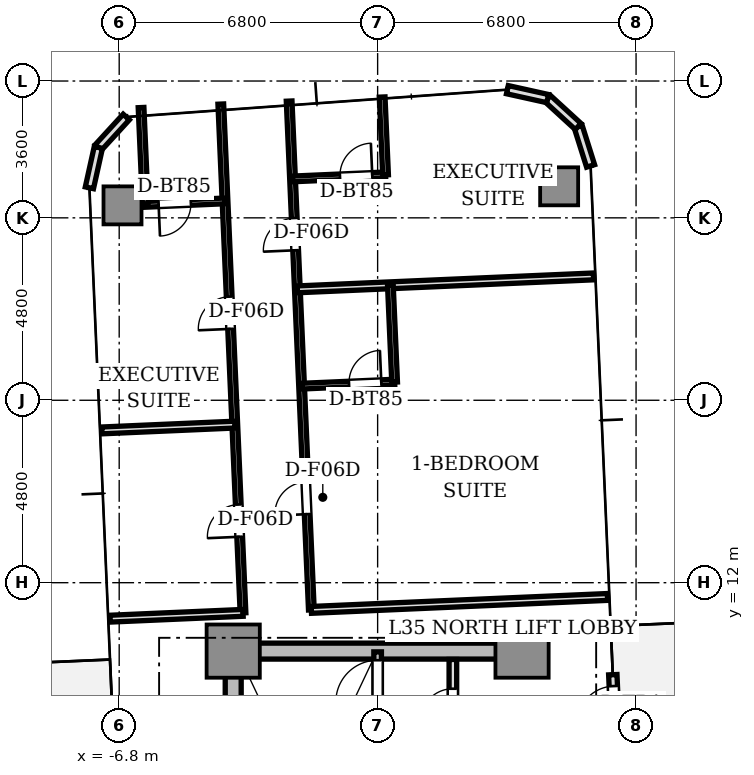
"""IFC4 building model, lengths in metres.
Left out: names, types, materials, properties, quantities, classifications, styles, units other than length and angle.
Written with IfcOpenShell. Run it as: python <this file> out.ifc"""

import sys

from ifc_helpers import new_model, si_unit, direction, frame, frame_2d, origin, origin_2d, place, context, subcontext, project, spatial, rectangle, extrude, source, transform, mapped, element, fill, save


model = new_model("IFC4")
c1 = context("Model", 3, precision=1e-05, world=origin(), true_north=direction((0.0, 1.0)))
c2 = subcontext(c1, "Body", "Model", "MODEL_VIEW")
j1 = project(units=[si_unit("LENGTHUNIT", "METRE"), si_unit("PLANEANGLEUNIT", "RADIAN")], contexts=[c1])
p1 = place(None, origin())
s1 = spatial("IfcSite", under=j1, at=p1, CompositionType="ELEMENT")
p2 = place(p1, origin())
s2 = spatial("IfcBuilding", under=s1, at=p2, CompositionType="ELEMENT")
p3 = place(p2, frame((0.0, 0.0, 128.2)))
s3 = spatial("IfcBuildingStorey", under=s2, at=p3, CompositionType="ELEMENT", Elevation=128.2)
p4 = place(p3, frame((-3.55, 10.2, 0.0), z_axis=(0.0, 0.0, 1.0), x_axis=(1.0, 0.0, 0.0)))
e1 = element("IfcWall", 1, at=p4, inside=s3, PredefinedType="SHEAR", context=c2, shape_type="SweptSolid", body=[
    extrude(rectangle(XDim=7.1, YDim=0.42, at=frame_2d((3.55, 0.0))), origin(), (0.0, 0.0, 1.0), 3.11),
])
p5 = place(p3, frame((-3.8, 2.85, 0.0), z_axis=(0.0, 0.0, 1.0), x_axis=(0.0, 1.0, 0.0)))
e2 = element("IfcWall", 2, at=p5, inside=s3, PredefinedType="SHEAR", context=c2, shape_type="SweptSolid", body=[
    extrude(rectangle(XDim=6.9, YDim=0.42, at=frame_2d((3.45, 0.0))), origin(), (0.0, 0.0, 1.0), 3.11),
])
m1 = source(origin(), c2, "Body", "SweptSolid", [
    extrude(rectangle(XDim=1.4, YDim=1.4, at=origin_2d()), origin(), (0.0, 0.0, 1.0), 3.11),
])
for number, where, z_axis, x_axis in (
    (3, (-3.8, 10.2, 0.0), (0.0, 0.0, 1.0), (1.0, 0.0, 0.0)),
    (4, (3.8, 10.2, 0.0), (0.0, 0.0, 1.0), (1.0, 0.0, 0.0)),
):
    element("IfcColumn", number, at=place(p3, frame(where, z_axis=z_axis, x_axis=x_axis)), inside=s3, PredefinedType="COLUMN", context=c2, shape_type="MappedRepresentation", body=[
        mapped(m1, transform((0.0, 0.0, 0.0), scale=1.0)),
    ])
m2 = source(origin(), c2, "Body", "SweptSolid", [
    extrude(rectangle(XDim=1.0, YDim=1.0, at=origin_2d()), origin(), (0.0, 0.0, 1.0), 3.11),
])
for number, where, z_axis, x_axis in (
    (5, (4.776, 22.43, 0.0), (0.0, 0.0, 1.0), (1.0, 0.0, 0.0)),
    (6, (-6.713, 21.928, 0.0), (0.0, 0.0, 1.0), (1.0, 0.0, 0.0)),
):
    element("IfcColumn", number, at=place(p3, frame(where, z_axis=z_axis, x_axis=x_axis)), inside=s3, PredefinedType="COLUMN", context=c2, shape_type="MappedRepresentation", body=[
        mapped(m2, transform((0.0, 0.0, 0.0), scale=1.0)),
    ])
p6 = place(p3, frame((6.306, 6.882, 0.0), z_axis=(0.0, 0.0, 1.0), x_axis=(-0.043672655174, 0.999045894436, 0.0)))
e7 = element("IfcWall", 7, at=p6, inside=s3, PredefinedType="STANDARD", context=c2, shape_type="SweptSolid", body=[
    extrude(rectangle(XDim=2.7, YDim=0.22, at=frame_2d((1.35, 0.0))), origin(), (0.0, 0.0, 1.0), 3.11),
])
p7 = place(p6, frame((1.4, 0.0, 0.0)))
e8 = element("IfcOpeningElement", 8, at=p7, cuts=e7, PredefinedType="OPENING", context=c2, shape_type="SweptSolid", body=[
    extrude(rectangle(XDim=1.0, YDim=2.2, at=frame_2d((0.5, 1.1))), frame((0.0, 0.12, 0.0), z_axis=(0.0, -1.0, 0.0), x_axis=(1.0, 0.0, 0.0)), (0.0, 0.0, 1.0), 0.24),
])
p8 = place(p3, frame((5.604, 22.966, 0.0), z_axis=(0.0, 0.0, 1.0), x_axis=(-0.300755105707, 0.953701403161, 0.0)))
e9 = element("IfcWall", 9, at=p8, inside=s3, PredefinedType="STANDARD", context=c2, shape_type="SweptSolid", body=[
    extrude(rectangle(XDim=1.087, YDim=0.22, at=frame_2d((0.543, 0.0))), origin(), (0.0, 0.0, 1.0), 3.11),
])
p9 = place(p3, frame((5.277, 24.003, 0.0), z_axis=(0.0, 0.0, 1.0), x_axis=(-0.737312600672, 0.675551721847, 0.0)))
e10 = element("IfcWall", 10, at=p9, inside=s3, PredefinedType="STANDARD", context=c2, shape_type="SweptSolid", body=[
    extrude(rectangle(XDim=1.087, YDim=0.22, at=frame_2d((0.543, 0.0))), origin(), (0.0, 0.0, 1.0), 3.11),
])
for number, where, z_axis, x_axis in (
    (11, (4.475, 24.737, 0.0), (0.0, 0.0, 1.0), (-0.976, 0.217, 0.0)),
    (12, (-6.614, 24.253, 0.0), (0.0, 0.0, 1.0), (-0.676, -0.737, 0.0)),
):
    element("IfcWall", number, at=place(p3, frame(where, z_axis=z_axis, x_axis=x_axis)), inside=s3, PredefinedType="STANDARD", context=c2, shape_type="SweptSolid", body=[
        extrude(rectangle(XDim=1.087, YDim=0.22, at=frame_2d((0.543, 0.0))), origin(), (0.0, 0.0, 1.0), 3.11),
    ])
p10 = place(p3, frame((-7.349, 23.452, 0.0), z_axis=(0.0, 0.0, 1.0), x_axis=(-0.216454939174, -0.976292609471, 0.0)))
e13 = element("IfcWall", 13, at=p10, inside=s3, PredefinedType="STANDARD", context=c2, shape_type="SweptSolid", body=[
    extrude(rectangle(XDim=1.087, YDim=0.22, at=frame_2d((0.544, 0.0))), origin(), (0.0, 0.0, 1.0), 3.11),
])
p11 = place(p3, frame((0.0, 2.5, 0.0), z_axis=(0.0, 0.0, 1.0), x_axis=(0.0, 1.0, 0.0)))
e14 = element("IfcWall", 14, at=p11, inside=s3, PredefinedType="SOLIDWALL", context=c2, shape_type="SweptSolid", body=[
    extrude(rectangle(XDim=7.68, YDim=0.2, at=frame_2d((3.84, 0.0))), origin(), (0.0, 0.0, 1.0), 3.11),
])
p12 = place(p11, frame((6.36, 0.0, 0.0)))
e15 = element("IfcOpeningElement", 15, at=p12, cuts=e14, PredefinedType="OPENING", context=c2, shape_type="SweptSolid", body=[
    extrude(rectangle(XDim=1.1, YDim=2.15, at=frame_2d((0.55, 1.075))), frame((0.0, 0.11, 0.0), z_axis=(0.0, -1.0, 0.0), x_axis=(1.0, 0.0, 0.0)), (0.0, 0.0, 1.0), 0.22),
])
p13 = place(p3, frame((1.98, 5.32, 0.0), z_axis=(0.0, 0.0, 1.0), x_axis=(0.0, 1.0, 0.0)))
e16 = element("IfcWall", 16, at=p13, inside=s3, PredefinedType="SOLIDWALL", context=c2, shape_type="SweptSolid", body=[
    extrude(rectangle(XDim=4.66, YDim=0.2, at=frame_2d((2.33, 0.0))), origin(), (0.0, 0.0, 1.0), 2.66),
])
p14 = place(p13, frame((3.04, 0.0, 0.0)))
e17 = element("IfcOpeningElement", 17, at=p14, cuts=e16, PredefinedType="OPENING", context=c2, shape_type="SweptSolid", body=[
    extrude(rectangle(XDim=0.85, YDim=2.1, at=frame_2d((0.425, 1.05))), frame((0.0, 0.11, 0.0), z_axis=(0.0, -1.0, 0.0), x_axis=(1.0, 0.0, 0.0)), (0.0, 0.0, 1.0), 0.22),
])
p15 = place(p3, frame((-3.542, 11.206, 0.0), z_axis=(0.0, 0.0, 1.0), x_axis=(-0.043617493533, 0.999048304267, 0.0)))
e18 = element("IfcWall", 18, at=p15, inside=s3, PredefinedType="PARTITIONING", context=c2, shape_type="SweptSolid", body=[
    extrude(rectangle(XDim=13.4, YDim=0.15, at=frame_2d((6.7, 0.0))), origin(), (0.0, 0.0, 1.0), 2.66),
])
p16 = place(p15, frame((2.004, 0.0, 0.0)))
e19 = element("IfcOpeningElement", 19, at=p16, cuts=e18, PredefinedType="OPENING", context=c2, shape_type="SweptSolid", body=[
    extrude(rectangle(XDim=0.85, YDim=2.1, at=frame_2d((0.425, 1.05))), frame((0.0, 0.085, 0.0), z_axis=(0.0, -1.0, 0.0), x_axis=(1.0, 0.0, 0.0)), (0.0, 0.0, 1.0), 0.17),
])
p17 = place(p15, frame((7.479, 0.0, 0.0)))
e20 = element("IfcOpeningElement", 20, at=p17, cuts=e18, PredefinedType="OPENING", context=c2, shape_type="SweptSolid", body=[
    extrude(rectangle(XDim=0.85, YDim=2.1, at=frame_2d((0.425, 1.05))), frame((0.0, 0.085, 0.0), z_axis=(0.0, -1.0, 0.0), x_axis=(1.0, 0.0, 0.0)), (0.0, 0.0, 1.0), 0.17),
])
p18 = place(p3, frame((-1.744, 11.285, 0.0), z_axis=(0.0, 0.0, 1.0), x_axis=(-0.043617493533, 0.999048304267, 0.0)))
e21 = element("IfcWall", 21, at=p18, inside=s3, PredefinedType="PARTITIONING", context=c2, shape_type="SweptSolid", body=[
    extrude(rectangle(XDim=13.4, YDim=0.15, at=frame_2d((6.7, 0.0))), origin(), (0.0, 0.0, 1.0), 2.66),
])
p19 = place(p18, frame((2.521, 0.0, 0.0)))
e22 = element("IfcOpeningElement", 22, at=p19, cuts=e21, PredefinedType="OPENING", context=c2, shape_type="SweptSolid", body=[
    extrude(rectangle(XDim=0.85, YDim=2.1, at=frame_2d((0.425, 1.05))), frame((0.0, 0.085, 0.0), z_axis=(0.0, -1.0, 0.0), x_axis=(1.0, 0.0, 0.0)), (0.0, 0.0, 1.0), 0.17),
])
p20 = place(p18, frame((9.471, 0.0, 0.0)))
e23 = element("IfcOpeningElement", 23, at=p20, cuts=e21, PredefinedType="OPENING", context=c2, shape_type="SweptSolid", body=[
    extrude(rectangle(XDim=0.85, YDim=2.1, at=frame_2d((0.425, 1.05))), frame((0.0, 0.085, 0.0), z_axis=(0.0, -1.0, 0.0), x_axis=(1.0, 0.0, 0.0)), (0.0, 0.0, 1.0), 0.17),
])
p21 = place(p3, frame((-3.542, 11.206, 0.0), z_axis=(0.0, 0.0, 1.0), x_axis=(-0.999046129111, -0.04366728647, 0.0)))
e24 = element("IfcWall", 24, at=p21, inside=s3, PredefinedType="PARTITIONING", context=c2, shape_type="SweptSolid", body=[
    extrude(rectangle(XDim=3.5, YDim=0.18, at=frame_2d((1.75, 0.0))), origin(), (0.0, 0.0, 1.0), 2.66),
])
p22 = place(p3, frame((6.049, 11.625, 0.0), z_axis=(0.0, 0.0, 1.0), x_axis=(-0.999047634936, -0.043632821702, 0.0)))
e25 = element("IfcWall", 25, at=p22, inside=s3, PredefinedType="PARTITIONING", context=c2, shape_type="SweptSolid", body=[
    extrude(rectangle(XDim=7.8, YDim=0.18, at=frame_2d((3.9, 0.0))), origin(), (0.0, 0.0, 1.0), 2.66),
])
p23 = place(p3, frame((-3.758, 16.159, 0.0), z_axis=(0.0, 0.0, 1.0), x_axis=(-0.999049302422, -0.04359462501, 0.0)))
e26 = element("IfcWall", 26, at=p23, inside=s3, PredefinedType="PARTITIONING", context=c2, shape_type="SweptSolid", body=[
    extrude(rectangle(XDim=3.5, YDim=0.18, at=frame_2d((1.75, 0.0))), origin(), (0.0, 0.0, 1.0), 2.66),
])
p24 = place(p3, frame((-4.015, 22.046, 0.0), z_axis=(0.0, 0.0, 1.0), x_axis=(-0.999044054836, -0.043714717167, 0.0)))
e27 = element("IfcWall", 27, at=p24, inside=s3, PredefinedType="PARTITIONING", context=c2, shape_type="SweptSolid", body=[
    extrude(rectangle(XDim=2.1, YDim=0.15, at=frame_2d((1.05, 0.0))), origin(), (0.0, 0.0, 1.0), 2.58),
])
p25 = place(p24, frame((0.9, 0.0, 0.0)))
e28 = element("IfcOpeningElement", 28, at=p25, cuts=e27, PredefinedType="OPENING", context=c2, shape_type="SweptSolid", body=[
    extrude(rectangle(XDim=0.85, YDim=2.1, at=frame_2d((0.425, 1.05))), frame((0.0, 0.085, 0.0), z_axis=(0.0, -1.0, 0.0), x_axis=(1.0, 0.0, 0.0)), (0.0, 0.0, 1.0), 0.17),
])
p26 = place(p3, frame((-6.113, 21.954, 0.0), z_axis=(0.0, 0.0, 1.0), x_axis=(-0.043657425146, 0.999046560091, 0.0)))
e29 = element("IfcWall", 29, at=p26, inside=s3, PredefinedType="PARTITIONING", context=c2, shape_type="SweptSolid", body=[
    extrude(rectangle(XDim=2.55, YDim=0.15, at=frame_2d((1.275, 0.0))), origin(), (0.0, 0.0, 1.0), 2.66),
])
p27 = place(p3, frame((-2.112, 19.719, 0.0), z_axis=(0.0, 0.0, 1.0), x_axis=(0.999047634936, 0.043632821702, 0.0)))
e30 = element("IfcWall", 30, at=p27, inside=s3, PredefinedType="PARTITIONING", context=c2, shape_type="SweptSolid", body=[
    extrude(rectangle(XDim=7.8, YDim=0.18, at=frame_2d((3.9, 0.0))), origin(), (0.0, 0.0, 1.0), 2.66),
])
p28 = place(p3, frame((-2.001, 17.171, 0.0), z_axis=(0.0, 0.0, 1.0), x_axis=(0.99905145222, 0.043545330602, 0.0)))
e31 = element("IfcWall", 31, at=p28, inside=s3, PredefinedType="PARTITIONING", context=c2, shape_type="SweptSolid", body=[
    extrude(rectangle(XDim=2.45, YDim=0.15, at=frame_2d((1.225, 0.0))), origin(), (0.0, 0.0, 1.0), 2.66),
])
p29 = place(p28, frame((1.25, 0.0, 0.0)))
e32 = element("IfcOpeningElement", 32, at=p29, cuts=e31, PredefinedType="OPENING", context=c2, shape_type="SweptSolid", body=[
    extrude(rectangle(XDim=0.85, YDim=2.1, at=frame_2d((0.425, 1.05))), frame((0.0, 0.085, 0.0), z_axis=(0.0, -1.0, 0.0), x_axis=(1.0, 0.0, 0.0)), (0.0, 0.0, 1.0), 0.17),
])
p30 = place(p3, frame((0.447, 17.278, 0.0), z_axis=(0.0, 0.0, 1.0), x_axis=(-0.043657425146, 0.999046560091, 0.0)))
e33 = element("IfcWall", 33, at=p30, inside=s3, PredefinedType="PARTITIONING", context=c2, shape_type="SweptSolid", body=[
    extrude(rectangle(XDim=2.55, YDim=0.15, at=frame_2d((1.275, 0.0))), origin(), (0.0, 0.0, 1.0), 2.66),
])
p31 = place(p3, frame((-2.239, 22.624, 0.0), z_axis=(0.0, 0.0, 1.0), x_axis=(0.999047112283, 0.043644787072, 0.0)))
e34 = element("IfcWall", 34, at=p31, inside=s3, PredefinedType="PARTITIONING", context=c2, shape_type="SweptSolid", body=[
    extrude(rectangle(XDim=2.45, YDim=0.15, at=frame_2d((1.225, 0.0))), origin(), (0.0, 0.0, 1.0), 2.66),
])
p32 = place(p31, frame((1.25, 0.0, 0.0)))
e35 = element("IfcOpeningElement", 35, at=p32, cuts=e34, PredefinedType="OPENING", context=c2, shape_type="SweptSolid", body=[
    extrude(rectangle(XDim=0.85, YDim=2.1, at=frame_2d((0.425, 1.05))), frame((0.0, 0.085, 0.0), z_axis=(0.0, -1.0, 0.0), x_axis=(1.0, 0.0, 0.0)), (0.0, 0.0, 1.0), 0.17),
])
p33 = place(p3, frame((0.209, 22.731, 0.0), z_axis=(0.0, 0.0, 1.0), x_axis=(-0.043587097972, 0.999049630844, 0.0)))
e36 = element("IfcWall", 36, at=p33, inside=s3, PredefinedType="PARTITIONING", context=c2, shape_type="SweptSolid", body=[
    extrude(rectangle(XDim=2.05, YDim=0.15, at=frame_2d((1.025, 0.0))), origin(), (0.0, 0.0, 1.0), 2.66),
])
m3 = source(origin(), c2, "Body", "SweptSolid", [
    extrude(rectangle(XDim=1.0, YDim=0.05, at=origin_2d()), origin(), (0.0, 0.0, 1.0), 2.2),
])
p34 = place(p7, frame((0.5, 0.0, 0.0)))
e37 = element("IfcDoor", 37, at=p34, inside=s3, OperationType="SINGLE_SWING_LEFT", PredefinedType="DOOR", context=c2, shape_type="MappedRepresentation", body=[
    mapped(m3, transform((0.0, 0.0, 0.0), scale=1.0)),
])
fill(e8, e37)
m4 = source(origin(), c2, "Body", "SweptSolid", [
    extrude(rectangle(XDim=1.1, YDim=0.05, at=origin_2d()), origin(), (0.0, 0.0, 1.0), 2.15),
])
p35 = place(p12, frame((0.55, 0.0, 0.0)))
e38 = element("IfcDoor", 38, at=p35, inside=s3, OperationType="SINGLE_SWING_LEFT", PredefinedType="DOOR", context=c2, shape_type="MappedRepresentation", body=[
    mapped(m4, transform((0.0, 0.0, 0.0), scale=1.0)),
])
fill(e15, e38)
m5 = source(origin(), c2, "Body", "SweptSolid", [
    extrude(rectangle(XDim=0.85, YDim=0.05, at=origin_2d()), origin(), (0.0, 0.0, 1.0), 2.1),
])
p36 = place(p14, frame((0.425, 0.0, 0.0)))
e39 = element("IfcDoor", 39, at=p36, inside=s3, OperationType="SINGLE_SWING_LEFT", PredefinedType="DOOR", context=c2, shape_type="MappedRepresentation", body=[
    mapped(m5, transform((0.0, 0.0, 0.0), scale=1.0)),
])
fill(e17, e39)
p37 = place(p16, frame((0.425, 0.0, 0.0)))
e40 = element("IfcDoor", 40, at=p37, inside=s3, OperationType="SINGLE_SWING_LEFT", PredefinedType="DOOR", context=c2, shape_type="MappedRepresentation", body=[
    mapped(m5, transform((0.0, 0.0, 0.0), scale=1.0)),
])
fill(e19, e40)
p38 = place(p25, frame((0.425, 0.0, 0.0)))
e41 = element("IfcDoor", 41, at=p38, inside=s3, OperationType="SINGLE_SWING_RIGHT", PredefinedType="DOOR", context=c2, shape_type="MappedRepresentation", body=[
    mapped(m5, transform((0.0, 0.0, 0.0), scale=1.0)),
])
fill(e28, e41)
p39 = place(p17, frame((0.425, 0.0, 0.0)))
e42 = element("IfcDoor", 42, at=p39, inside=s3, OperationType="SINGLE_SWING_LEFT", PredefinedType="DOOR", context=c2, shape_type="MappedRepresentation", body=[
    mapped(m5, transform((0.0, 0.0, 0.0), scale=1.0)),
])
fill(e20, e42)
p40 = place(p29, frame((0.425, 0.0, 0.0)))
e43 = element("IfcDoor", 43, at=p40, inside=s3, OperationType="SINGLE_SWING_RIGHT", PredefinedType="DOOR", context=c2, shape_type="MappedRepresentation", body=[
    mapped(m5, transform((0.0, 0.0, 0.0), scale=1.0)),
])
fill(e32, e43)
p41 = place(p19, frame((0.425, 0.0, 0.0)))
e44 = element("IfcDoor", 44, at=p41, inside=s3, OperationType="SINGLE_SWING_LEFT", PredefinedType="DOOR", context=c2, shape_type="MappedRepresentation", body=[
    mapped(m5, transform((0.0, 0.0, 0.0), scale=1.0)),
])
fill(e22, e44)
p42 = place(p32, frame((0.425, 0.0, 0.0)))
e45 = element("IfcDoor", 45, at=p42, inside=s3, OperationType="SINGLE_SWING_RIGHT", PredefinedType="DOOR", context=c2, shape_type="MappedRepresentation", body=[
    mapped(m5, transform((0.0, 0.0, 0.0), scale=1.0)),
])
fill(e35, e45)
p43 = place(p20, frame((0.425, 0.0, 0.0)))
e46 = element("IfcDoor", 46, at=p43, inside=s3, OperationType="SINGLE_SWING_LEFT", PredefinedType="DOOR", context=c2, shape_type="MappedRepresentation", body=[
    mapped(m5, transform((0.0, 0.0, 0.0), scale=1.0)),
])
fill(e23, e46)
save(model, sys.argv[1])
